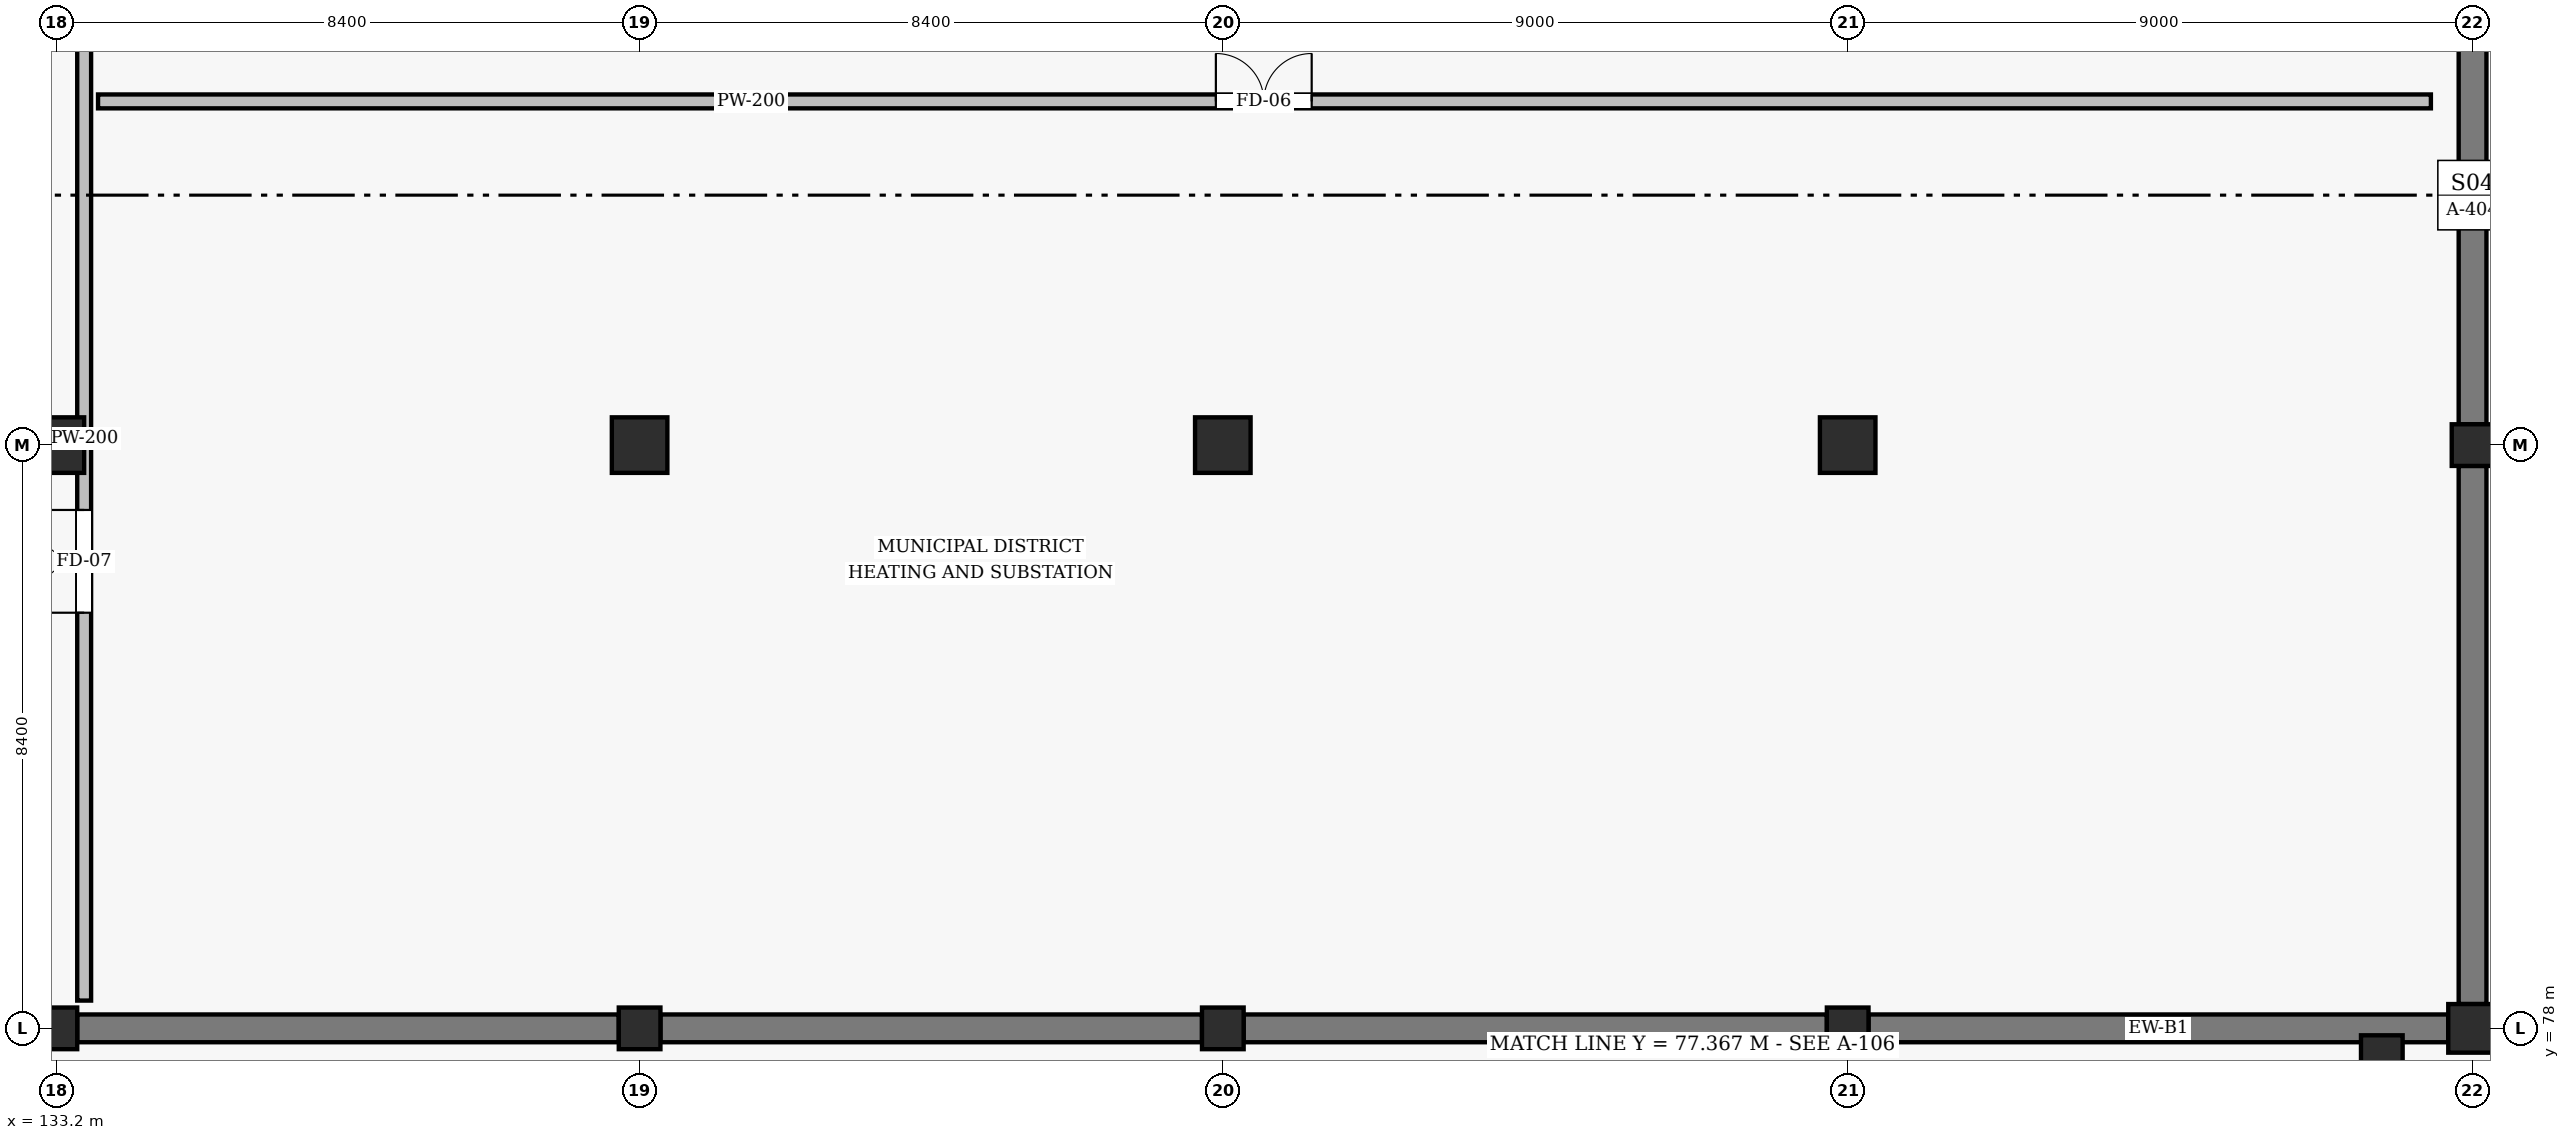
"""IFC4 building model, lengths in metres.
Left out: names, types, materials, properties, quantities, classifications, styles, units other than length and angle.
Written with IfcOpenShell. Run it as: python <this file> out.ifc"""

import sys

from ifc_helpers import new_model, si_unit, direction, frame, frame_2d, origin, origin_2d, place, context, subcontext, project, spatial, rectangle, hollow_rectangle, extrude, element, fill, save


model = new_model("IFC4")
c1 = context("Model", 3, precision=1e-05, world=origin(), true_north=direction((0.0, 1.0)))
c2 = subcontext(c1, "Body", "Model", "MODEL_VIEW")
j1 = project(units=[si_unit("LENGTHUNIT", "METRE"), si_unit("PLANEANGLEUNIT", "RADIAN")], contexts=[c1])
p1 = place(None, origin())
s1 = spatial("IfcSite", under=j1, at=p1, CompositionType="ELEMENT")
p2 = place(p1, origin())
s2 = spatial("IfcBuilding", under=s1, at=p2, CompositionType="ELEMENT")
p3 = place(p2, frame((0.0, 0.0, -4.8)))
s3 = spatial("IfcBuildingStorey", under=s2, at=p3, CompositionType="ELEMENT", Elevation=-4.8)
p4 = place(p3, frame((133.2, 78.0, 0.0), z_axis=(0.0, 0.0, 1.0), x_axis=(1.0, 0.0, 0.0)))
e1 = element("IfcColumn", 1, at=p4, inside=s3, PredefinedType="COLUMN", context=c2, shape_type="SweptSolid", body=[
    extrude(hollow_rectangle(XDim=0.6, YDim=0.6, WallThickness=0.025, InnerFilletRadius=0.025, OuterFilletRadius=0.05, at=origin_2d()), origin(), (0.0, 0.0, 1.0), 4.8),
])
p5 = place(p3, frame((133.2, 86.4, 0.0), z_axis=(0.0, 0.0, 1.0), x_axis=(1.0, 0.0, 0.0)))
e2 = element("IfcColumn", 2, at=p5, inside=s3, PredefinedType="COLUMN", context=c2, shape_type="SweptSolid", body=[
    extrude(rectangle(XDim=0.8, YDim=0.8, at=origin_2d()), origin(), (0.0, 0.0, 1.0), 4.8),
])
p6 = place(p3, frame((141.6, 78.0, 0.0), z_axis=(0.0, 0.0, 1.0), x_axis=(1.0, 0.0, 0.0)))
e3 = element("IfcColumn", 3, at=p6, inside=s3, PredefinedType="COLUMN", context=c2, shape_type="SweptSolid", body=[
    extrude(hollow_rectangle(XDim=0.6, YDim=0.6, WallThickness=0.025, InnerFilletRadius=0.025, OuterFilletRadius=0.05, at=origin_2d()), origin(), (0.0, 0.0, 1.0), 4.8),
])
p7 = place(p3, frame((141.6, 86.4, 0.0), z_axis=(0.0, 0.0, 1.0), x_axis=(1.0, 0.0, 0.0)))
e4 = element("IfcColumn", 4, at=p7, inside=s3, PredefinedType="COLUMN", context=c2, shape_type="SweptSolid", body=[
    extrude(rectangle(XDim=0.8, YDim=0.8, at=origin_2d()), origin(), (0.0, 0.0, 1.0), 4.8),
])
p8 = place(p3, frame((150.0, 78.0, 0.0), z_axis=(0.0, 0.0, 1.0), x_axis=(1.0, 0.0, 0.0)))
e5 = element("IfcColumn", 5, at=p8, inside=s3, PredefinedType="COLUMN", context=c2, shape_type="SweptSolid", body=[
    extrude(hollow_rectangle(XDim=0.6, YDim=0.6, WallThickness=0.025, InnerFilletRadius=0.025, OuterFilletRadius=0.05, at=origin_2d()), origin(), (0.0, 0.0, 1.0), 4.8),
])
p9 = place(p3, frame((150.0, 86.4, 0.0), z_axis=(0.0, 0.0, 1.0), x_axis=(1.0, 0.0, 0.0)))
e6 = element("IfcColumn", 6, at=p9, inside=s3, PredefinedType="COLUMN", context=c2, shape_type="SweptSolid", body=[
    extrude(rectangle(XDim=0.8, YDim=0.8, at=origin_2d()), origin(), (0.0, 0.0, 1.0), 4.8),
])
p10 = place(p3, frame((159.0, 78.0, 0.0), z_axis=(0.0, 0.0, 1.0), x_axis=(1.0, 0.0, 0.0)))
e7 = element("IfcColumn", 7, at=p10, inside=s3, PredefinedType="COLUMN", context=c2, shape_type="SweptSolid", body=[
    extrude(hollow_rectangle(XDim=0.6, YDim=0.6, WallThickness=0.025, InnerFilletRadius=0.025, OuterFilletRadius=0.05, at=origin_2d()), origin(), (0.0, 0.0, 1.0), 4.8),
])
p11 = place(p3, frame((159.0, 86.4, 0.0), z_axis=(0.0, 0.0, 1.0), x_axis=(1.0, 0.0, 0.0)))
e8 = element("IfcColumn", 8, at=p11, inside=s3, PredefinedType="COLUMN", context=c2, shape_type="SweptSolid", body=[
    extrude(rectangle(XDim=0.8, YDim=0.8, at=origin_2d()), origin(), (0.0, 0.0, 1.0), 4.8),
])
p12 = place(p3, frame((168.0, 78.0, 0.0), z_axis=(0.0, 0.0, 1.0), x_axis=(1.0, 0.0, 0.0)))
e9 = element("IfcColumn", 9, at=p12, inside=s3, PredefinedType="COLUMN", context=c2, shape_type="SweptSolid", body=[
    extrude(hollow_rectangle(XDim=0.7, YDim=0.7, WallThickness=0.032, InnerFilletRadius=0.032, OuterFilletRadius=0.064, at=origin_2d()), origin(), (0.0, 0.0, 1.0), 4.8),
])
p13 = place(p3, frame((168.0, 86.4, 0.0), z_axis=(0.0, 0.0, 1.0), x_axis=(1.0, 0.0, 0.0)))
e10 = element("IfcColumn", 10, at=p13, inside=s3, PredefinedType="COLUMN", context=c2, shape_type="SweptSolid", body=[
    extrude(hollow_rectangle(XDim=0.6, YDim=0.6, WallThickness=0.025, InnerFilletRadius=0.025, OuterFilletRadius=0.05, at=origin_2d()), origin(), (0.0, 0.0, 1.0), 4.8),
])
p14 = place(p3, frame((166.693, 77.6, 0.0), z_axis=(0.0, 0.0, 1.0), x_axis=(1.0, 0.0, 0.0)))
e11 = element("IfcColumn", 11, at=p14, inside=s3, PredefinedType="COLUMN", context=c2, shape_type="SweptSolid", body=[
    extrude(rectangle(XDim=0.6, YDim=0.6, at=origin_2d()), origin(), (0.0, 0.0, 1.0), 4.56),
])
for number, where, z_axis, x_axis in (
    (12, (133.5, 78.0, 0.0), (0.0, 0.0, 1.0), (1.0, 0.0, 0.0)),
    (13, (141.9, 78.0, 0.0), (0.0, 0.0, 1.0), (1.0, 0.0, 0.0)),
):
    element("IfcWall", number, at=place(p3, frame(where, z_axis=z_axis, x_axis=x_axis)), inside=s3, PredefinedType="SOLIDWALL", context=c2, shape_type="SweptSolid", body=[
        extrude(rectangle(XDim=7.8, YDim=0.4, at=frame_2d((3.9, 0.0))), origin(), (0.0, 0.0, 1.0), 3.79),
    ])
p15 = place(p3, frame((150.3, 78.0, 0.0), z_axis=(0.0, 0.0, 1.0), x_axis=(1.0, 0.0, 0.0)))
e14 = element("IfcWall", 14, at=p15, inside=s3, PredefinedType="SOLIDWALL", context=c2, shape_type="SweptSolid", body=[
    extrude(rectangle(XDim=8.4, YDim=0.4, at=frame_2d((4.2, 0.0))), origin(), (0.0, 0.0, 1.0), 3.89),
])
p16 = place(p3, frame((159.3, 78.0, 0.0), z_axis=(0.0, 0.0, 1.0), x_axis=(1.0, 0.0, 0.0)))
e15 = element("IfcWall", 15, at=p16, inside=s3, PredefinedType="SOLIDWALL", context=c2, shape_type="SweptSolid", body=[
    extrude(rectangle(XDim=8.35, YDim=0.4, at=frame_2d((4.175, 0.0))), origin(), (0.0, 0.0, 1.0), 3.89),
])
p17 = place(p3, frame((168.0, 78.35, 0.0), z_axis=(0.0, 0.0, 1.0), x_axis=(0.0, 1.0, 0.0)))
e16 = element("IfcWall", 16, at=p17, inside=s3, PredefinedType="SOLIDWALL", context=c2, shape_type="SweptSolid", body=[
    extrude(rectangle(XDim=7.75, YDim=0.4, at=frame_2d((3.875, 0.0))), origin(), (0.0, 0.0, 1.0), 3.84),
])
p18 = place(p3, frame((168.0, 86.7, 0.0), z_axis=(0.0, 0.0, 1.0), x_axis=(0.0, 1.0, 0.0)))
e17 = element("IfcWall", 17, at=p18, inside=s3, PredefinedType="SOLIDWALL", context=c2, shape_type="SweptSolid", body=[
    extrude(rectangle(XDim=7.8, YDim=0.4, at=frame_2d((3.9, 0.0))), origin(), (0.0, 0.0, 1.0), 3.84),
])
p19 = place(p3, frame((133.8, 91.35, 0.0), z_axis=(0.0, 0.0, 1.0), x_axis=(1.0, 0.0, 0.0)))
e18 = element("IfcWall", 18, at=p19, inside=s3, PredefinedType="SOLIDWALL", context=c2, shape_type="SweptSolid", body=[
    extrude(rectangle(XDim=33.6, YDim=0.2, at=frame_2d((16.8, 0.0))), origin(), (0.0, 0.0, 1.0), 3.84),
])
p20 = place(p19, frame((16.1, 0.0, 0.0)))
e19 = element("IfcOpeningElement", 19, at=p20, cuts=e18, PredefinedType="OPENING", context=c2, shape_type="SweptSolid", body=[
    extrude(rectangle(XDim=1.38, YDim=2.15, at=frame_2d((0.69, 1.075))), frame((0.0, 0.11, 0.0), z_axis=(0.0, -1.0, 0.0), x_axis=(1.0, 0.0, 0.0)), (0.0, 0.0, 1.0), 0.22),
])
p21 = place(p3, frame((133.6, 78.4, 0.0), z_axis=(0.0, 0.0, 1.0), x_axis=(0.0, 1.0, 0.0)))
e20 = element("IfcWall", 20, at=p21, inside=s3, PredefinedType="SOLIDWALL", context=c2, shape_type="SweptSolid", body=[
    extrude(rectangle(XDim=16.2, YDim=0.2, at=frame_2d((8.1, 0.0))), origin(), (0.0, 0.0, 1.0), 3.79),
])
p22 = place(p21, frame((5.586, 0.0, 0.0)))
e21 = element("IfcOpeningElement", 21, at=p22, cuts=e20, PredefinedType="OPENING", context=c2, shape_type="SweptSolid", body=[
    extrude(rectangle(XDim=1.48, YDim=2.22, at=frame_2d((0.74, 1.11))), frame((0.0, 0.11, 0.0), z_axis=(0.0, -1.0, 0.0), x_axis=(1.0, 0.0, 0.0)), (0.0, 0.0, 1.0), 0.22),
])
p23 = place(p20, origin())
e22 = element("IfcDoor", 22, at=p23, inside=s3, OperationType="DOUBLE_DOOR_SINGLE_SWING", PredefinedType="DOOR", context=c2, shape_type="SweptSolid", body=[
    extrude(rectangle(XDim=1.38, YDim=2.15, at=frame_2d((0.69, 1.075))), frame((0.0, 0.025, 0.0), z_axis=(0.0, -1.0, 0.0), x_axis=(1.0, 0.0, 0.0)), (0.0, 0.0, 1.0), 0.05),
])
fill(e19, e22)
p24 = place(p22, origin())
e23 = element("IfcDoor", 23, at=p24, inside=s3, OperationType="DOUBLE_DOOR_SINGLE_SWING", PredefinedType="DOOR", context=c2, shape_type="SweptSolid", body=[
    extrude(rectangle(XDim=1.48, YDim=2.22, at=frame_2d((0.74, 1.11))), frame((0.0, 0.025, 0.0), z_axis=(0.0, -1.0, 0.0), x_axis=(1.0, 0.0, 0.0)), (0.0, 0.0, 1.0), 0.05),
])
fill(e21, e23)
save(model, sys.argv[1])
